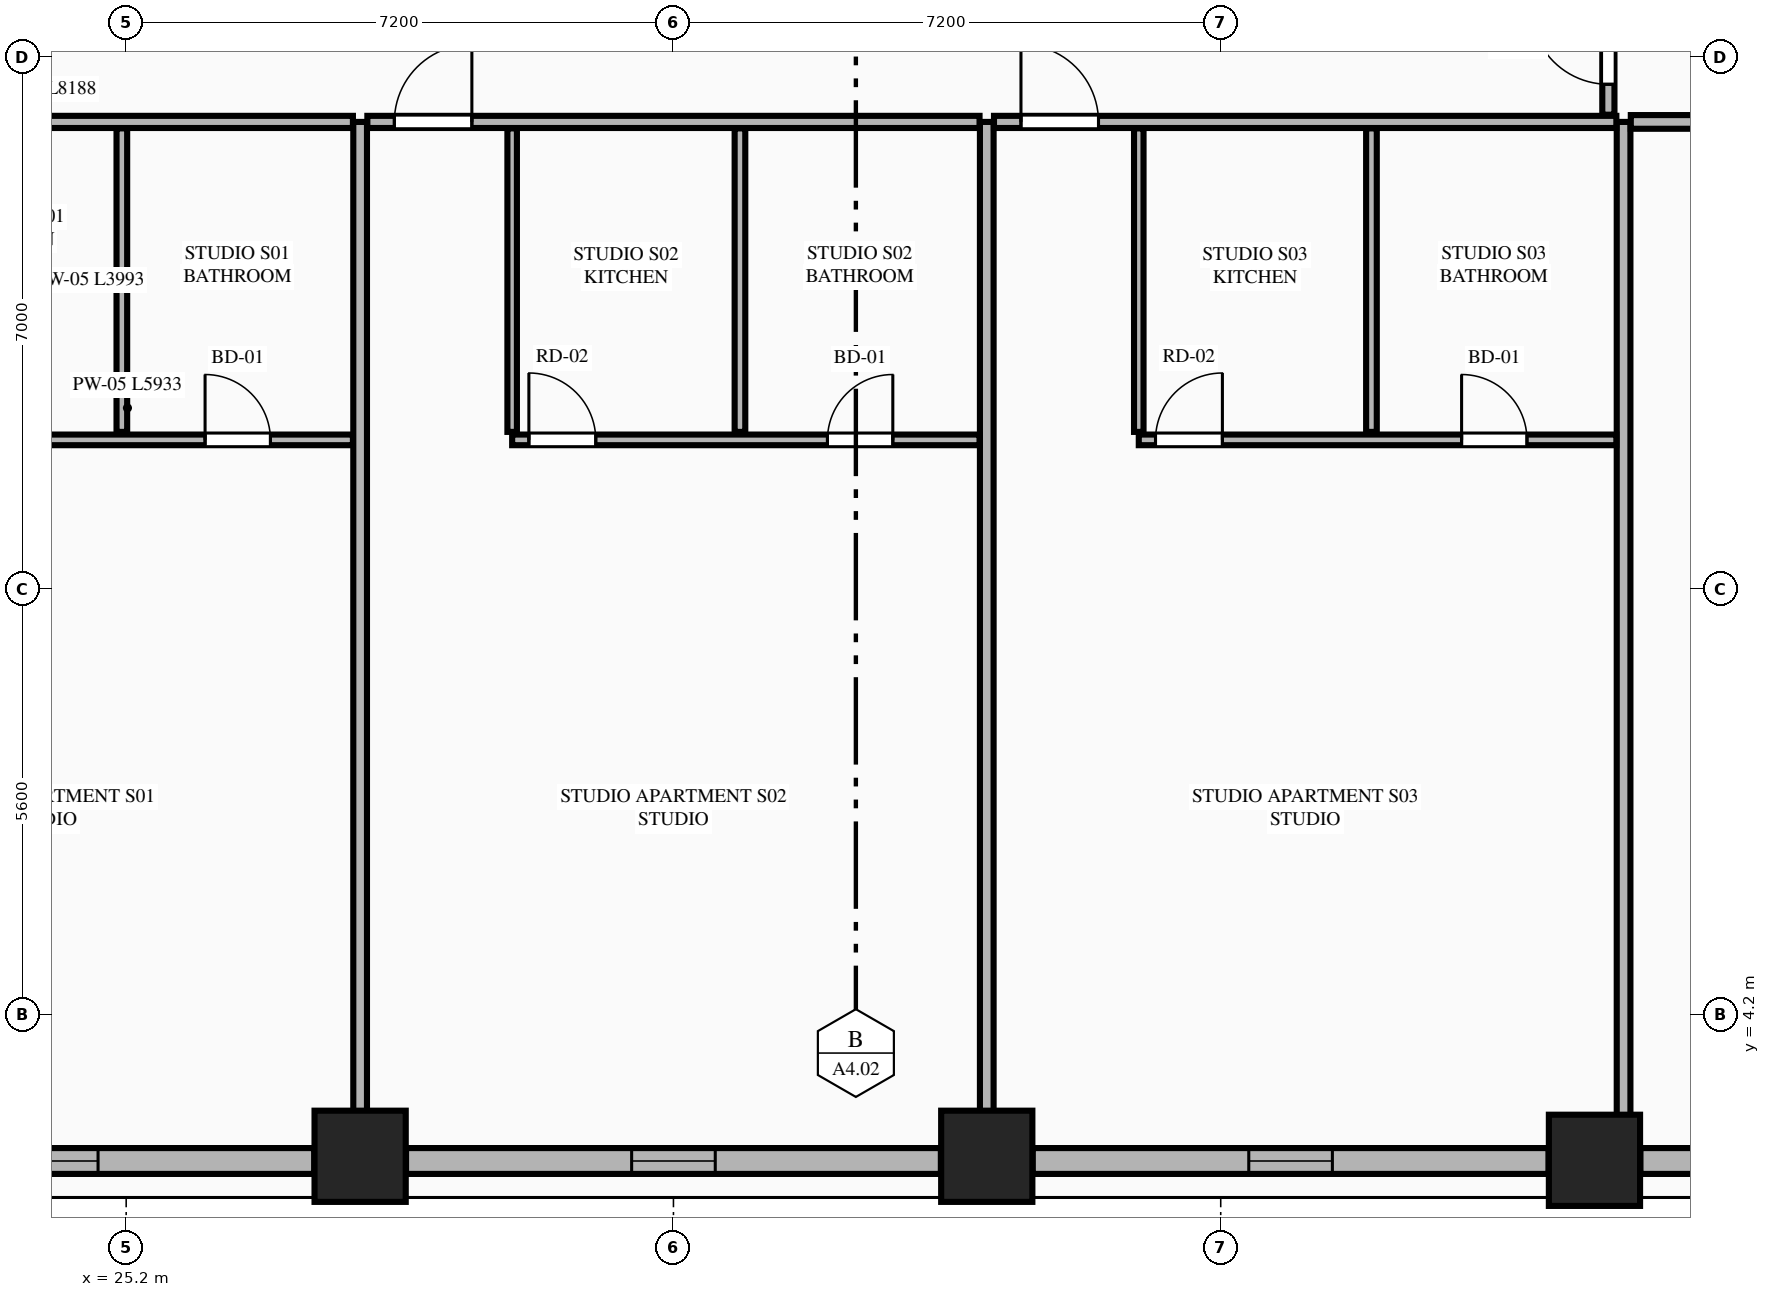
"""IFC4 building model, lengths in metres.
Left out: names, types, materials, properties, quantities, classifications, styles, units other than length and angle.
Written with IfcOpenShell. Run it as: python <this file> out.ifc"""

import sys

from ifc_helpers import new_model, si_unit, direction, frame, frame_2d, origin, origin_2d, place, context, subcontext, project, spatial, rectangle, extrude, element, fill, save


model = new_model("IFC4")
c1 = context("Model", 3, precision=1e-05, world=origin(), true_north=direction((0.0, 1.0)))
c2 = subcontext(c1, "Body", "Model", "MODEL_VIEW")
j1 = project(units=[si_unit("LENGTHUNIT", "METRE"), si_unit("PLANEANGLEUNIT", "RADIAN")], contexts=[c1])
p1 = place(None, origin())
s1 = spatial("IfcSite", under=j1, at=p1, CompositionType="ELEMENT")
p2 = place(p1, origin())
s2 = spatial("IfcBuilding", under=s1, at=p2, CompositionType="ELEMENT")
p3 = place(p2, frame((0.0, 0.0, 39.1)))
s3 = spatial("IfcBuildingStorey", under=s2, at=p3, CompositionType="ELEMENT", Elevation=39.1)
for number, where, z_axis, x_axis in (
    (1, (28.278, 2.342, 0.0), (0.0, 0.0, 1.0), (1.0, 0.0, 0.0)),
    (2, (36.522, 2.342, 0.0), (0.0, 0.0, 1.0), (1.0, 0.0, 0.0)),
    (3, (44.517, 2.289, 0.0), (0.0, 0.0, 1.0), (1.0, 0.0, 0.0)),
):
    element("IfcColumn", number, at=place(p3, frame(where, z_axis=z_axis, x_axis=x_axis)), inside=s3, PredefinedType="COLUMN", context=c2, shape_type="SweptSolid", body=[
        extrude(rectangle(XDim=1.2, YDim=1.2, at=origin_2d()), origin(), (0.0, 0.0, 1.0), 3.55),
    ])
p4 = place(p3, frame((20.887, 2.28, 0.0), z_axis=(0.0, 0.0, 1.0), x_axis=(1.0, 0.0, 0.0)))
e4 = element("IfcWall", 4, at=p4, inside=s3, PredefinedType="STANDARD", context=c2, shape_type="SweptSolid", body=[
    extrude(rectangle(XDim=6.787, YDim=0.34, at=frame_2d((3.394, 0.0))), origin(), (0.0, 0.0, 1.0), 2.787),
])
p5 = place(p4, frame((2.843, 0.0, 0.75)))
e5 = element("IfcOpeningElement", 5, at=p5, cuts=e4, PredefinedType="OPENING", context=c2, shape_type="SweptSolid", body=[
    extrude(rectangle(XDim=1.1, YDim=1.887, at=frame_2d((0.55, 0.943))), frame((0.0, 0.18, 0.0), z_axis=(0.0, -1.0, 0.0), x_axis=(1.0, 0.0, 0.0)), (0.0, 0.0, 1.0), 0.36),
])
p6 = place(p3, frame((28.882, 2.28, 0.0), z_axis=(0.0, 0.0, 1.0), x_axis=(1.0, 0.0, 0.0)))
e6 = element("IfcWall", 6, at=p6, inside=s3, PredefinedType="STANDARD", context=c2, shape_type="SweptSolid", body=[
    extrude(rectangle(XDim=7.036, YDim=0.34, at=frame_2d((3.518, 0.0))), origin(), (0.0, 0.0, 1.0), 2.787),
])
p7 = place(p6, frame((2.968, 0.0, 0.75)))
e7 = element("IfcOpeningElement", 7, at=p7, cuts=e6, PredefinedType="OPENING", context=c2, shape_type="SweptSolid", body=[
    extrude(rectangle(XDim=1.1, YDim=1.887, at=frame_2d((0.55, 0.943))), frame((0.0, 0.18, 0.0), z_axis=(0.0, -1.0, 0.0), x_axis=(1.0, 0.0, 0.0)), (0.0, 0.0, 1.0), 0.36),
])
p8 = place(p3, frame((37.126, 2.28, 0.0), z_axis=(0.0, 0.0, 1.0), x_axis=(1.0, 0.0, 0.0)))
e8 = element("IfcWall", 8, at=p8, inside=s3, PredefinedType="STANDARD", context=c2, shape_type="SweptSolid", body=[
    extrude(rectangle(XDim=6.787, YDim=0.34, at=frame_2d((3.394, 0.0))), origin(), (0.0, 0.0, 1.0), 2.787),
])
p9 = place(p8, frame((2.843, 0.0, 0.75)))
e9 = element("IfcOpeningElement", 9, at=p9, cuts=e8, PredefinedType="OPENING", context=c2, shape_type="SweptSolid", body=[
    extrude(rectangle(XDim=1.1, YDim=1.887, at=frame_2d((0.55, 0.943))), frame((0.0, 0.18, 0.0), z_axis=(0.0, -1.0, 0.0), x_axis=(1.0, 0.0, 0.0)), (0.0, 0.0, 1.0), 0.36),
])
p10 = place(p3, frame((45.121, 2.28, 0.0), z_axis=(0.0, 0.0, 1.0), x_axis=(1.0, 0.0, 0.0)))
e10 = element("IfcWall", 10, at=p10, inside=s3, PredefinedType="STANDARD", context=c2, shape_type="SweptSolid", body=[
    extrude(rectangle(XDim=1.245, YDim=0.34, at=frame_2d((0.623, 0.0))), origin(), (0.0, 0.0, 1.0), 3.33),
])
for number, where, z_axis, x_axis in (
    (11, (28.278, 2.455, 0.0), (0.0, 0.0, 1.0), (0.0, 1.0, 0.0)),
    (12, (36.522, 2.455, 0.0), (0.0, 0.0, 1.0), (0.0, 1.0, 0.0)),
):
    element("IfcWall", number, at=place(p3, frame(where, z_axis=z_axis, x_axis=x_axis)), inside=s3, PredefinedType="PARTITIONING", context=c2, shape_type="SweptSolid", body=[
        extrude(rectangle(XDim=13.495, YDim=0.18, at=frame_2d((6.748, 0.0))), origin(), (0.0, 0.0, 1.0), 2.636),
    ])
p11 = place(p3, frame((44.9, 2.455, 0.0), z_axis=(0.0, 0.0, 1.0), x_axis=(0.0, 1.0, 0.0)))
e13 = element("IfcWall", 13, at=p11, inside=s3, PredefinedType="PARTITIONING", context=c2, shape_type="SweptSolid", body=[
    extrude(rectangle(XDim=13.495, YDim=0.18, at=frame_2d((6.748, 0.0))), origin(), (0.0, 0.0, 1.0), 3.33),
])
p12 = place(p3, frame((19.995, 15.95, 0.0), z_axis=(0.0, 0.0, 1.0), x_axis=(1.0, 0.0, 0.0)))
e14 = element("IfcWall", 14, at=p12, inside=s3, PredefinedType="PARTITIONING", context=c2, shape_type="SweptSolid", body=[
    extrude(rectangle(XDim=8.188, YDim=0.16, at=frame_2d((4.094, 0.0))), origin(), (0.0, 0.0, 1.0), 3.33),
])
p13 = place(p12, frame((0.705, 0.0, 0.0)))
e15 = element("IfcOpeningElement", 15, at=p13, cuts=e14, PredefinedType="OPENING", context=c2, shape_type="SweptSolid", body=[
    extrude(rectangle(XDim=1.02, YDim=2.25, at=frame_2d((0.51, 1.125))), frame((0.0, 0.09, 0.0), z_axis=(0.0, -1.0, 0.0), x_axis=(1.0, 0.0, 0.0)), (0.0, 0.0, 1.0), 0.18),
])
p14 = place(p3, frame((22.25, 11.767, 0.0), z_axis=(0.0, 0.0, 1.0), x_axis=(1.0, 0.0, 0.0)))
e16 = element("IfcWall", 16, at=p14, inside=s3, PredefinedType="PLUMBINGWALL", context=c2, shape_type="SweptSolid", body=[
    extrude(rectangle(XDim=5.933, YDim=0.14, at=frame_2d((2.967, 0.0))), origin(), (0.0, 0.0, 1.0), 3.33),
])
p15 = place(p14, frame((3.988, 0.0, 0.0)))
e17 = element("IfcOpeningElement", 17, at=p15, cuts=e16, PredefinedType="OPENING", context=c2, shape_type="SweptSolid", body=[
    extrude(rectangle(XDim=0.86, YDim=2.1, at=frame_2d((0.43, 1.05))), frame((0.0, 0.08, 0.0), z_axis=(0.0, -1.0, 0.0), x_axis=(1.0, 0.0, 0.0)), (0.0, 0.0, 1.0), 0.16),
])
p16 = place(p14, frame((0.22, 0.0, 0.0)))
e18 = element("IfcOpeningElement", 18, at=p16, cuts=e16, PredefinedType="OPENING", context=c2, shape_type="SweptSolid", body=[
    extrude(rectangle(XDim=0.88, YDim=2.15, at=frame_2d((0.44, 1.075))), frame((0.0, 0.08, 0.0), z_axis=(0.0, -1.0, 0.0), x_axis=(1.0, 0.0, 0.0)), (0.0, 0.0, 1.0), 0.16),
])
p17 = place(p3, frame((25.143, 11.872, 0.0), z_axis=(0.0, 0.0, 1.0), x_axis=(0.0, 1.0, 0.0)))
e19 = element("IfcWall", 19, at=p17, inside=s3, PredefinedType="PLUMBINGWALL", context=c2, shape_type="SweptSolid", body=[
    extrude(rectangle(XDim=3.993, YDim=0.14, at=frame_2d((1.997, 0.0))), origin(), (0.0, 0.0, 1.0), 3.33),
])
p18 = place(p3, frame((28.373, 15.95, 0.0), z_axis=(0.0, 0.0, 1.0), x_axis=(1.0, 0.0, 0.0)))
e20 = element("IfcWall", 20, at=p18, inside=s3, PredefinedType="PARTITIONING", context=c2, shape_type="SweptSolid", body=[
    extrude(rectangle(XDim=8.054, YDim=0.16, at=frame_2d((4.027, 0.0))), origin(), (0.0, 0.0, 1.0), 3.33),
])
p19 = place(p18, frame((0.355, 0.0, 0.0)))
e21 = element("IfcOpeningElement", 21, at=p19, cuts=e20, PredefinedType="OPENING", context=c2, shape_type="SweptSolid", body=[
    extrude(rectangle(XDim=1.02, YDim=2.25, at=frame_2d((0.51, 1.125))), frame((0.0, 0.09, 0.0), z_axis=(0.0, -1.0, 0.0), x_axis=(1.0, 0.0, 0.0)), (0.0, 0.0, 1.0), 0.18),
])
p20 = place(p3, frame((30.278, 11.872, 0.0), z_axis=(0.0, 0.0, 1.0), x_axis=(0.0, 1.0, 0.0)))
e22 = element("IfcWall", 22, at=p20, inside=s3, PredefinedType="PARTITIONING", context=c2, shape_type="SweptSolid", body=[
    extrude(rectangle(XDim=3.993, YDim=0.125, at=frame_2d((1.997, 0.0))), origin(), (0.0, 0.0, 1.0), 3.33),
])
p21 = place(p3, frame((30.278, 11.767, 0.0), z_axis=(0.0, 0.0, 1.0), x_axis=(1.0, 0.0, 0.0)))
e23 = element("IfcWall", 23, at=p21, inside=s3, PredefinedType="PLUMBINGWALL", context=c2, shape_type="SweptSolid", body=[
    extrude(rectangle(XDim=6.149, YDim=0.14, at=frame_2d((3.074, 0.0))), origin(), (0.0, 0.0, 1.0), 3.33),
])
p22 = place(p21, frame((4.148, 0.0, 0.0)))
e24 = element("IfcOpeningElement", 24, at=p22, cuts=e23, PredefinedType="OPENING", context=c2, shape_type="SweptSolid", body=[
    extrude(rectangle(XDim=0.86, YDim=2.1, at=frame_2d((0.43, 1.05))), frame((0.0, 0.08, 0.0), z_axis=(0.0, -1.0, 0.0), x_axis=(1.0, 0.0, 0.0)), (0.0, 0.0, 1.0), 0.16),
])
p23 = place(p21, frame((0.22, 0.0, 0.0)))
e25 = element("IfcOpeningElement", 25, at=p23, cuts=e23, PredefinedType="OPENING", context=c2, shape_type="SweptSolid", body=[
    extrude(rectangle(XDim=0.88, YDim=2.15, at=frame_2d((0.44, 1.075))), frame((0.0, 0.08, 0.0), z_axis=(0.0, -1.0, 0.0), x_axis=(1.0, 0.0, 0.0)), (0.0, 0.0, 1.0), 0.16),
])
p24 = place(p3, frame((33.275, 11.872, 0.0), z_axis=(0.0, 0.0, 1.0), x_axis=(0.0, 1.0, 0.0)))
e26 = element("IfcWall", 26, at=p24, inside=s3, PredefinedType="PLUMBINGWALL", context=c2, shape_type="SweptSolid", body=[
    extrude(rectangle(XDim=3.993, YDim=0.14, at=frame_2d((1.997, 0.0))), origin(), (0.0, 0.0, 1.0), 3.33),
])
p25 = place(p3, frame((36.617, 15.95, 0.0), z_axis=(0.0, 0.0, 1.0), x_axis=(1.0, 0.0, 0.0)))
e27 = element("IfcWall", 27, at=p25, inside=s3, PredefinedType="PARTITIONING", context=c2, shape_type="SweptSolid", body=[
    extrude(rectangle(XDim=8.188, YDim=0.16, at=frame_2d((4.094, 0.0))), origin(), (0.0, 0.0, 1.0), 3.33),
])
p26 = place(p25, frame((0.355, 0.0, 0.0)))
e28 = element("IfcOpeningElement", 28, at=p26, cuts=e27, PredefinedType="OPENING", context=c2, shape_type="SweptSolid", body=[
    extrude(rectangle(XDim=1.02, YDim=2.25, at=frame_2d((0.51, 1.125))), frame((0.0, 0.09, 0.0), z_axis=(0.0, -1.0, 0.0), x_axis=(1.0, 0.0, 0.0)), (0.0, 0.0, 1.0), 0.18),
])
p27 = place(p3, frame((38.522, 11.872, 0.0), z_axis=(0.0, 0.0, 1.0), x_axis=(0.0, 1.0, 0.0)))
e29 = element("IfcWall", 29, at=p27, inside=s3, PredefinedType="PARTITIONING", context=c2, shape_type="SweptSolid", body=[
    extrude(rectangle(XDim=3.993, YDim=0.125, at=frame_2d((1.997, 0.0))), origin(), (0.0, 0.0, 1.0), 3.33),
])
p28 = place(p3, frame((38.522, 11.767, 0.0), z_axis=(0.0, 0.0, 1.0), x_axis=(1.0, 0.0, 0.0)))
e30 = element("IfcWall", 30, at=p28, inside=s3, PredefinedType="PLUMBINGWALL", context=c2, shape_type="SweptSolid", body=[
    extrude(rectangle(XDim=6.283, YDim=0.14, at=frame_2d((3.142, 0.0))), origin(), (0.0, 0.0, 1.0), 3.33),
])
p29 = place(p28, frame((4.247, 0.0, 0.0)))
e31 = element("IfcOpeningElement", 31, at=p29, cuts=e30, PredefinedType="OPENING", context=c2, shape_type="SweptSolid", body=[
    extrude(rectangle(XDim=0.86, YDim=2.1, at=frame_2d((0.43, 1.05))), frame((0.0, 0.08, 0.0), z_axis=(0.0, -1.0, 0.0), x_axis=(1.0, 0.0, 0.0)), (0.0, 0.0, 1.0), 0.16),
])
p30 = place(p28, frame((0.22, 0.0, 0.0)))
e32 = element("IfcOpeningElement", 32, at=p30, cuts=e30, PredefinedType="OPENING", context=c2, shape_type="SweptSolid", body=[
    extrude(rectangle(XDim=0.88, YDim=2.15, at=frame_2d((0.44, 1.075))), frame((0.0, 0.08, 0.0), z_axis=(0.0, -1.0, 0.0), x_axis=(1.0, 0.0, 0.0)), (0.0, 0.0, 1.0), 0.16),
])
p31 = place(p3, frame((41.583, 11.872, 0.0), z_axis=(0.0, 0.0, 1.0), x_axis=(0.0, 1.0, 0.0)))
e33 = element("IfcWall", 33, at=p31, inside=s3, PredefinedType="PLUMBINGWALL", context=c2, shape_type="SweptSolid", body=[
    extrude(rectangle(XDim=3.993, YDim=0.14, at=frame_2d((1.997, 0.0))), origin(), (0.0, 0.0, 1.0), 3.33),
])
p32 = place(p3, frame((44.995, 15.95, 0.0), z_axis=(0.0, 0.0, 1.0), x_axis=(1.0, 0.0, 0.0)))
e34 = element("IfcWall", 34, at=p32, inside=s3, PredefinedType="PARTITIONING", context=c2, shape_type="SweptSolid", body=[
    extrude(rectangle(XDim=9.241, YDim=0.18, at=frame_2d((4.621, 0.0))), origin(), (0.0, 0.0, 1.0), 3.33),
])
p33 = place(p3, frame((44.7, 16.045, 0.0), z_axis=(0.0, 0.0, 1.0), x_axis=(0.0, 1.0, 0.0)))
e35 = element("IfcWall", 35, at=p33, inside=s3, PredefinedType="PARTITIONING", context=c2, shape_type="SweptSolid", body=[
    extrude(rectangle(XDim=8.168, YDim=0.16, at=frame_2d((4.084, 0.0))), origin(), (0.0, 0.0, 1.0), 3.33),
])
p34 = place(p33, frame((0.4, 0.0, 0.0)))
e36 = element("IfcOpeningElement", 36, at=p34, cuts=e35, PredefinedType="OPENING", context=c2, shape_type="SweptSolid", body=[
    extrude(rectangle(XDim=1.02, YDim=2.25, at=frame_2d((0.51, 1.125))), frame((0.0, 0.09, 0.0), z_axis=(0.0, -1.0, 0.0), x_axis=(1.0, 0.0, 0.0)), (0.0, 0.0, 1.0), 0.18),
])
p35 = place(p5, origin())
e37 = element("IfcWindow", 37, at=p35, inside=s3, PartitioningType="SINGLE_PANEL", PredefinedType="WINDOW", context=c2, shape_type="SweptSolid", body=[
    extrude(rectangle(XDim=1.1, YDim=1.887, at=frame_2d((0.55, 0.943))), frame((0.0, 0.03, 0.0), z_axis=(0.0, -1.0, 0.0), x_axis=(1.0, 0.0, 0.0)), (0.0, 0.0, 1.0), 0.06),
])
fill(e5, e37)
p36 = place(p7, origin())
e38 = element("IfcWindow", 38, at=p36, inside=s3, PartitioningType="SINGLE_PANEL", PredefinedType="WINDOW", context=c2, shape_type="SweptSolid", body=[
    extrude(rectangle(XDim=1.1, YDim=1.887, at=frame_2d((0.55, 0.943))), frame((0.0, 0.03, 0.0), z_axis=(0.0, -1.0, 0.0), x_axis=(1.0, 0.0, 0.0)), (0.0, 0.0, 1.0), 0.06),
])
fill(e7, e38)
p37 = place(p9, origin())
e39 = element("IfcWindow", 39, at=p37, inside=s3, PartitioningType="SINGLE_PANEL", PredefinedType="WINDOW", context=c2, shape_type="SweptSolid", body=[
    extrude(rectangle(XDim=1.1, YDim=1.887, at=frame_2d((0.55, 0.943))), frame((0.0, 0.03, 0.0), z_axis=(0.0, -1.0, 0.0), x_axis=(1.0, 0.0, 0.0)), (0.0, 0.0, 1.0), 0.06),
])
fill(e9, e39)
p38 = place(p15, origin())
e40 = element("IfcDoor", 40, at=p38, inside=s3, OperationType="SINGLE_SWING_LEFT", PredefinedType="DOOR", context=c2, shape_type="SweptSolid", body=[
    extrude(rectangle(XDim=0.86, YDim=2.1, at=frame_2d((0.43, 1.05))), frame((0.0, 0.025, 0.0), z_axis=(0.0, -1.0, 0.0), x_axis=(1.0, 0.0, 0.0)), (0.0, 0.0, 1.0), 0.05),
])
fill(e17, e40)
p39 = place(p22, origin())
e41 = element("IfcDoor", 41, at=p39, inside=s3, OperationType="SINGLE_SWING_RIGHT", PredefinedType="DOOR", context=c2, shape_type="SweptSolid", body=[
    extrude(rectangle(XDim=0.86, YDim=2.1, at=frame_2d((0.43, 1.05))), frame((0.0, 0.025, 0.0), z_axis=(0.0, -1.0, 0.0), x_axis=(1.0, 0.0, 0.0)), (0.0, 0.0, 1.0), 0.05),
])
fill(e24, e41)
p40 = place(p19, origin())
e42 = element("IfcDoor", 42, at=p40, inside=s3, OperationType="SINGLE_SWING_RIGHT", PredefinedType="DOOR", context=c2, shape_type="SweptSolid", body=[
    extrude(rectangle(XDim=1.02, YDim=2.25, at=frame_2d((0.51, 1.125))), frame((0.0, 0.025, 0.0), z_axis=(0.0, -1.0, 0.0), x_axis=(1.0, 0.0, 0.0)), (0.0, 0.0, 1.0), 0.05),
])
fill(e21, e42)
p41 = place(p23, origin())
e43 = element("IfcDoor", 43, at=p41, inside=s3, OperationType="SINGLE_SWING_LEFT", PredefinedType="DOOR", context=c2, shape_type="SweptSolid", body=[
    extrude(rectangle(XDim=0.88, YDim=2.15, at=frame_2d((0.44, 1.075))), frame((0.0, 0.025, 0.0), z_axis=(0.0, -1.0, 0.0), x_axis=(1.0, 0.0, 0.0)), (0.0, 0.0, 1.0), 0.05),
])
fill(e25, e43)
p42 = place(p29, origin())
e44 = element("IfcDoor", 44, at=p42, inside=s3, OperationType="SINGLE_SWING_LEFT", PredefinedType="DOOR", context=c2, shape_type="SweptSolid", body=[
    extrude(rectangle(XDim=0.86, YDim=2.1, at=frame_2d((0.43, 1.05))), frame((0.0, 0.025, 0.0), z_axis=(0.0, -1.0, 0.0), x_axis=(1.0, 0.0, 0.0)), (0.0, 0.0, 1.0), 0.05),
])
fill(e31, e44)
p43 = place(p26, origin())
e45 = element("IfcDoor", 45, at=p43, inside=s3, OperationType="SINGLE_SWING_LEFT", PredefinedType="DOOR", context=c2, shape_type="SweptSolid", body=[
    extrude(rectangle(XDim=1.02, YDim=2.25, at=frame_2d((0.51, 1.125))), frame((0.0, 0.025, 0.0), z_axis=(0.0, -1.0, 0.0), x_axis=(1.0, 0.0, 0.0)), (0.0, 0.0, 1.0), 0.05),
])
fill(e28, e45)
p44 = place(p30, origin())
e46 = element("IfcDoor", 46, at=p44, inside=s3, OperationType="SINGLE_SWING_RIGHT", PredefinedType="DOOR", context=c2, shape_type="SweptSolid", body=[
    extrude(rectangle(XDim=0.88, YDim=2.15, at=frame_2d((0.44, 1.075))), frame((0.0, 0.025, 0.0), z_axis=(0.0, -1.0, 0.0), x_axis=(1.0, 0.0, 0.0)), (0.0, 0.0, 1.0), 0.05),
])
fill(e32, e46)
p45 = place(p34, origin())
e47 = element("IfcDoor", 47, at=p45, inside=s3, OperationType="SINGLE_SWING_RIGHT", PredefinedType="DOOR", context=c2, shape_type="SweptSolid", body=[
    extrude(rectangle(XDim=1.02, YDim=2.25, at=frame_2d((0.51, 1.125))), frame((0.0, 0.025, 0.0), z_axis=(0.0, -1.0, 0.0), x_axis=(1.0, 0.0, 0.0)), (0.0, 0.0, 1.0), 0.05),
])
fill(e36, e47)
save(model, sys.argv[1])
